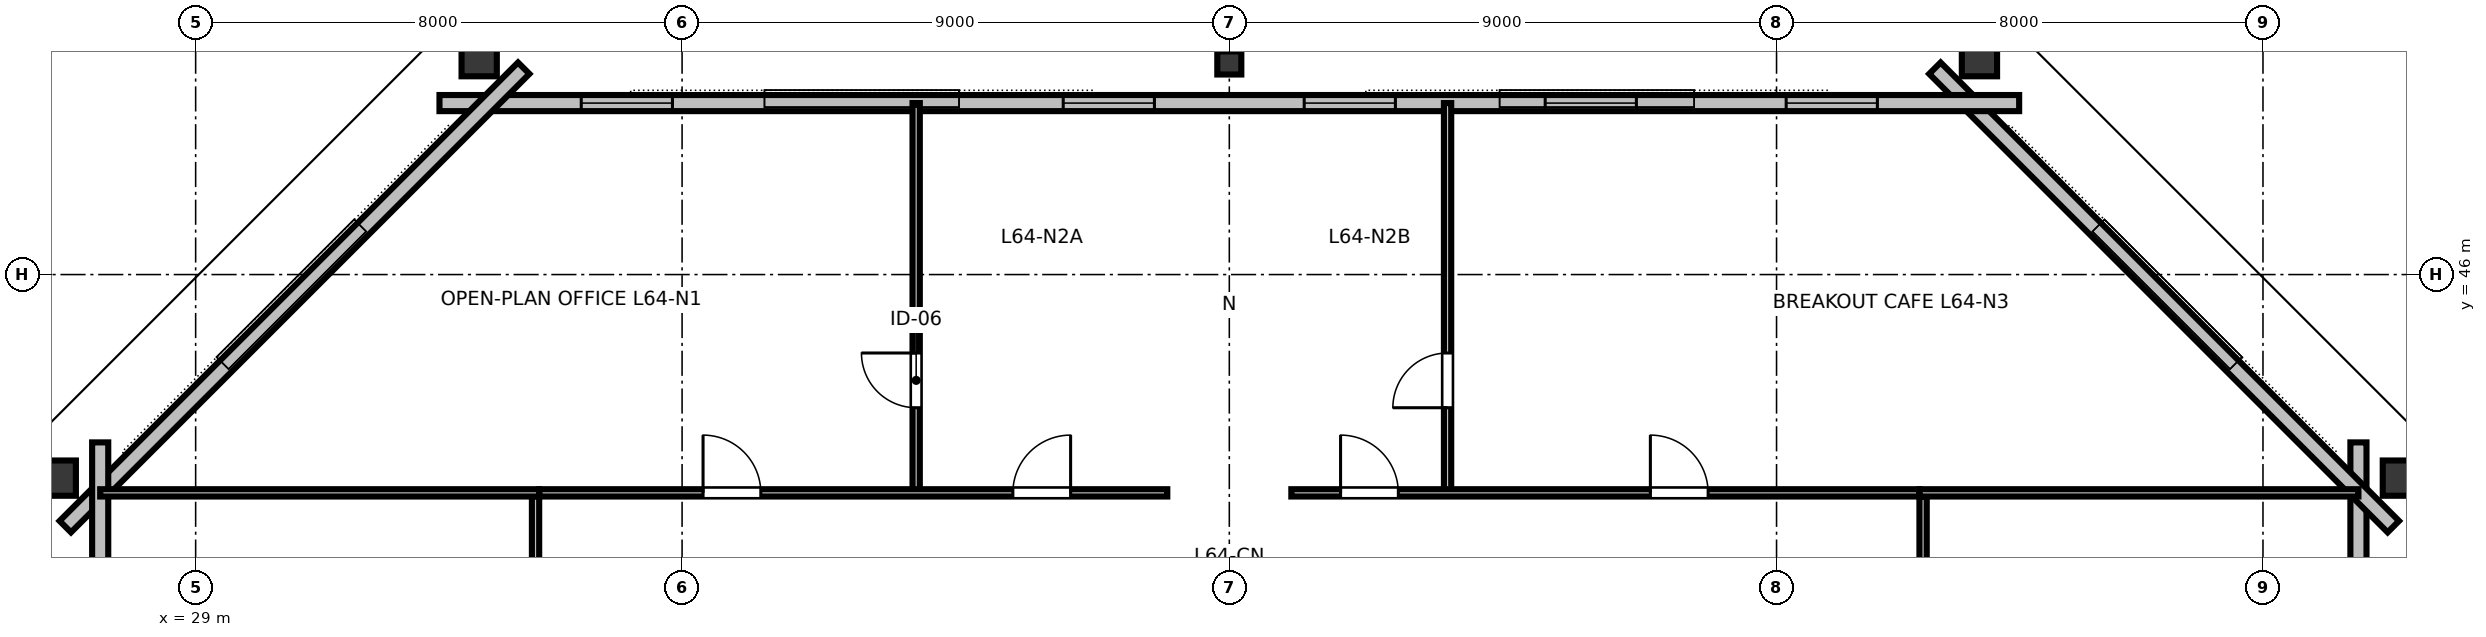
"""IFC4 building model, lengths in metres.
Left out: names, types, materials, properties, quantities, classifications, styles, units other than length and angle.
Written with IfcOpenShell. Run it as: python <this file> out.ifc"""

import sys

from ifc_helpers import new_model, si_unit, direction, frame, frame_2d, origin, origin_2d, place, context, subcontext, project, spatial, rectangle, hollow_rectangle, i_section, extrude, element, fill, save


model = new_model("IFC4")
c1 = context("Model", 3, precision=1e-05, world=origin(), true_north=direction((0.0, 1.0)))
c2 = subcontext(c1, "Body", "Model", "MODEL_VIEW")
j1 = project(units=[si_unit("LENGTHUNIT", "METRE"), si_unit("PLANEANGLEUNIT", "RADIAN")], contexts=[c1])
p1 = place(None, origin())
s1 = spatial("IfcSite", under=j1, at=p1, CompositionType="ELEMENT")
p2 = place(p1, origin())
s2 = spatial("IfcBuilding", under=s1, at=p2, CompositionType="ELEMENT")
p3 = place(p2, frame((0.0, 0.0, 243.0)))
s3 = spatial("IfcBuildingStorey", under=s2, at=p3, CompositionType="ELEMENT", Elevation=243.0)
for number, where, z_axis, x_axis in (
    (1, (65.32, 42.652, 0.0), (0.0, 0.0, 1.0), (0.0, 1.0, 0.0)),
    (2, (58.337, 49.61, 0.0), (0.0, 0.0, 1.0), (1.0, 0.0, 0.0)),
):
    element("IfcColumn", number, at=place(p3, frame(where, z_axis=z_axis, x_axis=x_axis)), inside=s3, PredefinedType="COLUMN", context=c2, shape_type="SweptSolid", body=[
        extrude(hollow_rectangle(XDim=0.58, YDim=0.7, WallThickness=0.032, at=origin_2d()), origin(), (0.0, 0.0, 1.0), 3.373),
    ])
p4 = place(p3, frame((46.0, 49.48, 0.0), z_axis=(0.0, 0.0, 1.0), x_axis=(1.0, 0.0, 0.0)))
e3 = element("IfcColumn", 3, at=p4, inside=s3, PredefinedType="COLUMN", context=c2, shape_type="SweptSolid", body=[
    extrude(i_section(OverallWidth=0.395, OverallDepth=0.38, WebThickness=0.019, FlangeThickness=0.03, FilletRadius=0.025, at=origin_2d()), origin(), (0.0, 0.0, 1.0), 3.373),
])
for number, where, z_axis, x_axis in (
    (4, (33.663, 49.61, 0.0), (0.0, 0.0, 1.0), (1.0, 0.0, 0.0)),
    (5, (26.68, 42.652, 0.0), (0.0, 0.0, 1.0), (0.0, 1.0, 0.0)),
):
    element("IfcColumn", number, at=place(p3, frame(where, z_axis=z_axis, x_axis=x_axis)), inside=s3, PredefinedType="COLUMN", context=c2, shape_type="SweptSolid", body=[
        extrude(hollow_rectangle(XDim=0.58, YDim=0.7, WallThickness=0.032, at=origin_2d()), origin(), (0.0, 0.0, 1.0), 3.373),
    ])
p5 = place(p3, frame((64.57, 20.76, 0.0), z_axis=(0.0, 0.0, 1.0), x_axis=(0.0, 1.0, 0.0)))
e6 = element("IfcWall", 6, at=p5, inside=s3, PredefinedType="STANDARD", context=c2, shape_type="SweptSolid", body=[
    extrude(rectangle(XDim=22.48, YDim=0.265, at=frame_2d((11.24, 0.0))), origin(), (0.0, 0.0, 1.0), 3.375),
])
p6 = place(p5, frame((2.378, 0.0, 0.85)))
e7 = element("IfcOpeningElement", 7, at=p6, cuts=e6, PredefinedType="OPENING", context=c2, shape_type="SweptSolid", body=[
    extrude(rectangle(XDim=1.5, YDim=1.85, at=frame_2d((0.75, 0.925))), frame((0.0, 0.142, 0.0), z_axis=(0.0, -1.0, 0.0), x_axis=(1.0, 0.0, 0.0)), (0.0, 0.0, 1.0), 0.285),
])
p7 = place(p5, frame((6.434, 0.0, 0.85)))
e8 = element("IfcOpeningElement", 8, at=p7, cuts=e6, PredefinedType="OPENING", context=c2, shape_type="SweptSolid", body=[
    extrude(rectangle(XDim=1.5, YDim=1.85, at=frame_2d((0.75, 0.925))), frame((0.0, 0.142, 0.0), z_axis=(0.0, -1.0, 0.0), x_axis=(1.0, 0.0, 0.0)), (0.0, 0.0, 1.0), 0.285),
])
p8 = place(p5, frame((14.546, 0.0, 0.85)))
e9 = element("IfcOpeningElement", 9, at=p8, cuts=e6, PredefinedType="OPENING", context=c2, shape_type="SweptSolid", body=[
    extrude(rectangle(XDim=1.5, YDim=1.85, at=frame_2d((0.75, 0.925))), frame((0.0, 0.142, 0.0), z_axis=(0.0, -1.0, 0.0), x_axis=(1.0, 0.0, 0.0)), (0.0, 0.0, 1.0), 0.285),
])
p9 = place(p5, frame((18.602, 0.0, 0.85)))
e10 = element("IfcOpeningElement", 10, at=p9, cuts=e6, PredefinedType="OPENING", context=c2, shape_type="SweptSolid", body=[
    extrude(rectangle(XDim=1.5, YDim=1.85, at=frame_2d((0.75, 0.925))), frame((0.0, 0.142, 0.0), z_axis=(0.0, -1.0, 0.0), x_axis=(1.0, 0.0, 0.0)), (0.0, 0.0, 1.0), 0.285),
])
p10 = place(p3, frame((65.144, 41.854, 0.0), z_axis=(0.0, 0.0, 1.0), x_axis=(-0.707106781187, 0.707106781187, 0.0)))
e11 = element("IfcWall", 11, at=p10, inside=s3, PredefinedType="STANDARD", context=c2, shape_type="SweptSolid", body=[
    extrude(rectangle(XDim=10.662, YDim=0.265, at=frame_2d((5.331, 0.0))), origin(), (0.0, 0.0, 1.0), 3.375),
])
p11 = place(p3, frame((58.99, 48.82, 0.0), z_axis=(0.0, 0.0, 1.0), x_axis=(-1.0, 0.0, 0.0)))
e12 = element("IfcWall", 12, at=p11, inside=s3, PredefinedType="STANDARD", context=c2, shape_type="SweptSolid", body=[
    extrude(rectangle(XDim=25.98, YDim=0.265, at=frame_2d((12.99, 0.0))), origin(), (0.0, 0.0, 1.0), 3.375),
])
p12 = place(p11, frame((2.332, 0.0, 0.85)))
e13 = element("IfcOpeningElement", 13, at=p12, cuts=e12, PredefinedType="OPENING", context=c2, shape_type="SweptSolid", body=[
    extrude(rectangle(XDim=1.5, YDim=1.85, at=frame_2d((0.75, 0.925))), frame((0.0, 0.142, 0.0), z_axis=(0.0, -1.0, 0.0), x_axis=(1.0, 0.0, 0.0)), (0.0, 0.0, 1.0), 0.285),
])
p13 = place(p11, frame((6.295, 0.0, 0.85)))
e14 = element("IfcOpeningElement", 14, at=p13, cuts=e12, PredefinedType="OPENING", context=c2, shape_type="SweptSolid", body=[
    extrude(rectangle(XDim=1.5, YDim=1.85, at=frame_2d((0.75, 0.925))), frame((0.0, 0.142, 0.0), z_axis=(0.0, -1.0, 0.0), x_axis=(1.0, 0.0, 0.0)), (0.0, 0.0, 1.0), 0.285),
])
p14 = place(p11, frame((10.258, 0.0, 0.85)))
e15 = element("IfcOpeningElement", 15, at=p14, cuts=e12, PredefinedType="OPENING", context=c2, shape_type="SweptSolid", body=[
    extrude(rectangle(XDim=1.5, YDim=1.85, at=frame_2d((0.75, 0.925))), frame((0.0, 0.142, 0.0), z_axis=(0.0, -1.0, 0.0), x_axis=(1.0, 0.0, 0.0)), (0.0, 0.0, 1.0), 0.285),
])
p15 = place(p11, frame((14.222, 0.0, 0.85)))
e16 = element("IfcOpeningElement", 16, at=p15, cuts=e12, PredefinedType="OPENING", context=c2, shape_type="SweptSolid", body=[
    extrude(rectangle(XDim=1.5, YDim=1.85, at=frame_2d((0.75, 0.925))), frame((0.0, 0.142, 0.0), z_axis=(0.0, -1.0, 0.0), x_axis=(1.0, 0.0, 0.0)), (0.0, 0.0, 1.0), 0.285),
])
p16 = place(p11, frame((22.148, 0.0, 0.85)))
e17 = element("IfcOpeningElement", 17, at=p16, cuts=e12, PredefinedType="OPENING", context=c2, shape_type="SweptSolid", body=[
    extrude(rectangle(XDim=1.5, YDim=1.85, at=frame_2d((0.75, 0.925))), frame((0.0, 0.142, 0.0), z_axis=(0.0, -1.0, 0.0), x_axis=(1.0, 0.0, 0.0)), (0.0, 0.0, 1.0), 0.285),
])
p17 = place(p3, frame((34.396, 49.394, 0.0), z_axis=(0.0, 0.0, 1.0), x_axis=(-0.707106781187, -0.707106781187, 0.0)))
e18 = element("IfcWall", 18, at=p17, inside=s3, PredefinedType="STANDARD", context=c2, shape_type="SweptSolid", body=[
    extrude(rectangle(XDim=10.662, YDim=0.265, at=frame_2d((5.331, 0.0))), origin(), (0.0, 0.0, 1.0), 3.375),
])
p18 = place(p3, frame((27.43, 43.24, 0.0), z_axis=(0.0, 0.0, 1.0), x_axis=(0.0, -1.0, 0.0)))
e19 = element("IfcWall", 19, at=p18, inside=s3, PredefinedType="STANDARD", context=c2, shape_type="SweptSolid", body=[
    extrude(rectangle(XDim=22.48, YDim=0.265, at=frame_2d((11.24, 0.0))), origin(), (0.0, 0.0, 1.0), 3.375),
])
p19 = place(p18, frame((2.378, 0.0, 0.85)))
e20 = element("IfcOpeningElement", 20, at=p19, cuts=e19, PredefinedType="OPENING", context=c2, shape_type="SweptSolid", body=[
    extrude(rectangle(XDim=1.5, YDim=1.85, at=frame_2d((0.75, 0.925))), frame((0.0, 0.142, 0.0), z_axis=(0.0, -1.0, 0.0), x_axis=(1.0, 0.0, 0.0)), (0.0, 0.0, 1.0), 0.285),
])
p20 = place(p18, frame((6.434, 0.0, 0.85)))
e21 = element("IfcOpeningElement", 21, at=p20, cuts=e19, PredefinedType="OPENING", context=c2, shape_type="SweptSolid", body=[
    extrude(rectangle(XDim=1.5, YDim=1.85, at=frame_2d((0.75, 0.925))), frame((0.0, 0.142, 0.0), z_axis=(0.0, -1.0, 0.0), x_axis=(1.0, 0.0, 0.0)), (0.0, 0.0, 1.0), 0.285),
])
p21 = place(p18, frame((14.546, 0.0, 0.85)))
e22 = element("IfcOpeningElement", 22, at=p21, cuts=e19, PredefinedType="OPENING", context=c2, shape_type="SweptSolid", body=[
    extrude(rectangle(XDim=1.5, YDim=1.85, at=frame_2d((0.75, 0.925))), frame((0.0, 0.142, 0.0), z_axis=(0.0, -1.0, 0.0), x_axis=(1.0, 0.0, 0.0)), (0.0, 0.0, 1.0), 0.285),
])
p22 = place(p18, frame((18.602, 0.0, 0.85)))
e23 = element("IfcOpeningElement", 23, at=p22, cuts=e19, PredefinedType="OPENING", context=c2, shape_type="SweptSolid", body=[
    extrude(rectangle(XDim=1.5, YDim=1.85, at=frame_2d((0.75, 0.925))), frame((0.0, 0.142, 0.0), z_axis=(0.0, -1.0, 0.0), x_axis=(1.0, 0.0, 0.0)), (0.0, 0.0, 1.0), 0.285),
])
p23 = place(p3, frame((40.85, 42.41, 0.0), z_axis=(0.0, 0.0, 1.0), x_axis=(0.0, 1.0, 0.0)))
e24 = element("IfcWall", 24, at=p23, inside=s3, PredefinedType="PARTITIONING", context=c2, shape_type="SweptSolid", body=[
    extrude(rectangle(XDim=6.41, YDim=0.12, at=frame_2d((3.205, 0.0))), origin(), (0.0, 0.0, 1.0), 2.655),
])
p24 = place(p23, frame((1.4, 0.0, 0.0)))
e25 = element("IfcOpeningElement", 25, at=p24, cuts=e24, PredefinedType="OPENING", context=c2, shape_type="SweptSolid", body=[
    extrude(rectangle(XDim=0.9, YDim=2.15, at=frame_2d((0.45, 1.075))), frame((0.0, 0.07, 0.0), z_axis=(0.0, -1.0, 0.0), x_axis=(1.0, 0.0, 0.0)), (0.0, 0.0, 1.0), 0.14),
])
p25 = place(p3, frame((49.59, 42.41, 0.0), z_axis=(0.0, 0.0, 1.0), x_axis=(0.0, 1.0, 0.0)))
e26 = element("IfcWall", 26, at=p25, inside=s3, PredefinedType="PARTITIONING", context=c2, shape_type="SweptSolid", body=[
    extrude(rectangle(XDim=6.41, YDim=0.12, at=frame_2d((3.205, 0.0))), origin(), (0.0, 0.0, 1.0), 2.655),
])
p26 = place(p25, frame((1.4, 0.0, 0.0)))
e27 = element("IfcOpeningElement", 27, at=p26, cuts=e26, PredefinedType="OPENING", context=c2, shape_type="SweptSolid", body=[
    extrude(rectangle(XDim=0.9, YDim=2.15, at=frame_2d((0.45, 1.075))), frame((0.0, 0.07, 0.0), z_axis=(0.0, -1.0, 0.0), x_axis=(1.0, 0.0, 0.0)), (0.0, 0.0, 1.0), 0.14),
])
p27 = place(p3, frame((34.65, 42.41, 0.0), z_axis=(0.0, 0.0, 1.0), x_axis=(1.0, 0.0, 0.0)))
e28 = element("IfcWall", 28, at=p27, inside=s3, PredefinedType="PARTITIONING", context=c2, shape_type="SweptSolid", body=[
    extrude(rectangle(XDim=10.33, YDim=0.12, at=frame_2d((5.165, 0.0))), origin(), (0.0, 0.0, 1.0), 2.655),
])
p28 = place(p27, frame((2.695, 0.0, 0.0)))
e29 = element("IfcOpeningElement", 29, at=p28, cuts=e28, PredefinedType="OPENING", context=c2, shape_type="SweptSolid", body=[
    extrude(rectangle(XDim=0.95, YDim=2.15, at=frame_2d((0.475, 1.075))), frame((0.0, 0.07, 0.0), z_axis=(0.0, -1.0, 0.0), x_axis=(1.0, 0.0, 0.0)), (0.0, 0.0, 1.0), 0.14),
])
p29 = place(p27, frame((7.79, 0.0, 0.0)))
e30 = element("IfcOpeningElement", 30, at=p29, cuts=e28, PredefinedType="OPENING", context=c2, shape_type="SweptSolid", body=[
    extrude(rectangle(XDim=0.95, YDim=2.15, at=frame_2d((0.475, 1.075))), frame((0.0, 0.07, 0.0), z_axis=(0.0, -1.0, 0.0), x_axis=(1.0, 0.0, 0.0)), (0.0, 0.0, 1.0), 0.14),
])
p30 = place(p3, frame((47.02, 42.41, 0.0), z_axis=(0.0, 0.0, 1.0), x_axis=(1.0, 0.0, 0.0)))
e31 = element("IfcWall", 31, at=p30, inside=s3, PredefinedType="PARTITIONING", context=c2, shape_type="SweptSolid", body=[
    extrude(rectangle(XDim=10.33, YDim=0.12, at=frame_2d((5.165, 0.0))), origin(), (0.0, 0.0, 1.0), 2.655),
])
p31 = place(p30, frame((0.81, 0.0, 0.0)))
e32 = element("IfcOpeningElement", 32, at=p31, cuts=e31, PredefinedType="OPENING", context=c2, shape_type="SweptSolid", body=[
    extrude(rectangle(XDim=0.95, YDim=2.15, at=frame_2d((0.475, 1.075))), frame((0.0, 0.07, 0.0), z_axis=(0.0, -1.0, 0.0), x_axis=(1.0, 0.0, 0.0)), (0.0, 0.0, 1.0), 0.14),
])
p32 = place(p30, frame((5.905, 0.0, 0.0)))
e33 = element("IfcOpeningElement", 33, at=p32, cuts=e31, PredefinedType="OPENING", context=c2, shape_type="SweptSolid", body=[
    extrude(rectangle(XDim=0.95, YDim=2.15, at=frame_2d((0.475, 1.075))), frame((0.0, 0.07, 0.0), z_axis=(0.0, -1.0, 0.0), x_axis=(1.0, 0.0, 0.0)), (0.0, 0.0, 1.0), 0.14),
])
p33 = place(p3, frame((34.59, 21.65, 0.0), z_axis=(0.0, 0.0, 1.0), x_axis=(0.0, 1.0, 0.0)))
e34 = element("IfcWall", 34, at=p33, inside=s3, PredefinedType="PARTITIONING", context=c2, shape_type="SweptSolid", body=[
    extrude(rectangle(XDim=20.7, YDim=0.12, at=frame_2d((10.35, 0.0))), origin(), (0.0, 0.0, 1.0), 2.655),
])
p34 = place(p33, frame((4.26, 0.0, 0.0)))
e35 = element("IfcOpeningElement", 35, at=p34, cuts=e34, PredefinedType="OPENING", context=c2, shape_type="SweptSolid", body=[
    extrude(rectangle(XDim=0.95, YDim=2.15, at=frame_2d((0.475, 1.075))), frame((0.0, 0.07, 0.0), z_axis=(0.0, -1.0, 0.0), x_axis=(1.0, 0.0, 0.0)), (0.0, 0.0, 1.0), 0.14),
])
p35 = place(p33, frame((14.411, 0.0, 0.0)))
e36 = element("IfcOpeningElement", 36, at=p35, cuts=e34, PredefinedType="OPENING", context=c2, shape_type="SweptSolid", body=[
    extrude(rectangle(XDim=0.95, YDim=2.15, at=frame_2d((0.475, 1.075))), frame((0.0, 0.07, 0.0), z_axis=(0.0, -1.0, 0.0), x_axis=(1.0, 0.0, 0.0)), (0.0, 0.0, 1.0), 0.14),
])
p36 = place(p3, frame((57.41, 21.65, 0.0), z_axis=(0.0, 0.0, 1.0), x_axis=(0.0, 1.0, 0.0)))
e37 = element("IfcWall", 37, at=p36, inside=s3, PredefinedType="PARTITIONING", context=c2, shape_type="SweptSolid", body=[
    extrude(rectangle(XDim=20.7, YDim=0.12, at=frame_2d((10.35, 0.0))), origin(), (0.0, 0.0, 1.0), 2.655),
])
p37 = place(p36, frame((9.875, 0.0, 0.0)))
e38 = element("IfcOpeningElement", 38, at=p37, cuts=e37, PredefinedType="OPENING", context=c2, shape_type="SweptSolid", body=[
    extrude(rectangle(XDim=0.95, YDim=2.15, at=frame_2d((0.475, 1.075))), frame((0.0, 0.07, 0.0), z_axis=(0.0, -1.0, 0.0), x_axis=(1.0, 0.0, 0.0)), (0.0, 0.0, 1.0), 0.14),
])
for number, where, z_axis, x_axis in (
    (39, (34.65, 42.41, 0.0), (0.0, 0.0, 1.0), (-1.0, 0.0, 0.0)),
    (40, (57.35, 42.41, 0.0), (0.0, 0.0, 1.0), (1.0, 0.0, 0.0)),
):
    element("IfcWall", number, at=place(p3, frame(where, z_axis=z_axis, x_axis=x_axis)), inside=s3, PredefinedType="PARTITIONING", context=c2, shape_type="SweptSolid", body=[
        extrude(rectangle(XDim=7.22, YDim=0.12, at=frame_2d((3.61, 0.0))), origin(), (0.0, 0.0, 1.0), 2.655),
    ])
p38 = place(p12, origin())
e41 = element("IfcWindow", 41, at=p38, inside=s3, PartitioningType="SINGLE_PANEL", PredefinedType="WINDOW", context=c2, shape_type="SweptSolid", body=[
    extrude(rectangle(XDim=1.5, YDim=1.85, at=frame_2d((0.75, 0.925))), frame((0.0, 0.03, 0.0), z_axis=(0.0, -1.0, 0.0), x_axis=(1.0, 0.0, 0.0)), (0.0, 0.0, 1.0), 0.06),
])
fill(e13, e41)
p39 = place(p13, origin())
e42 = element("IfcWindow", 42, at=p39, inside=s3, PartitioningType="SINGLE_PANEL", PredefinedType="WINDOW", context=c2, shape_type="SweptSolid", body=[
    extrude(rectangle(XDim=1.5, YDim=1.85, at=frame_2d((0.75, 0.925))), frame((0.0, 0.03, 0.0), z_axis=(0.0, -1.0, 0.0), x_axis=(1.0, 0.0, 0.0)), (0.0, 0.0, 1.0), 0.06),
])
fill(e14, e42)
p40 = place(p14, origin())
e43 = element("IfcWindow", 43, at=p40, inside=s3, PartitioningType="SINGLE_PANEL", PredefinedType="WINDOW", context=c2, shape_type="SweptSolid", body=[
    extrude(rectangle(XDim=1.5, YDim=1.85, at=frame_2d((0.75, 0.925))), frame((0.0, 0.03, 0.0), z_axis=(0.0, -1.0, 0.0), x_axis=(1.0, 0.0, 0.0)), (0.0, 0.0, 1.0), 0.06),
])
fill(e15, e43)
p41 = place(p15, origin())
e44 = element("IfcWindow", 44, at=p41, inside=s3, PartitioningType="SINGLE_PANEL", PredefinedType="WINDOW", context=c2, shape_type="SweptSolid", body=[
    extrude(rectangle(XDim=1.5, YDim=1.85, at=frame_2d((0.75, 0.925))), frame((0.0, 0.03, 0.0), z_axis=(0.0, -1.0, 0.0), x_axis=(1.0, 0.0, 0.0)), (0.0, 0.0, 1.0), 0.06),
])
fill(e16, e44)
p42 = place(p16, origin())
e45 = element("IfcWindow", 45, at=p42, inside=s3, PartitioningType="SINGLE_PANEL", PredefinedType="WINDOW", context=c2, shape_type="SweptSolid", body=[
    extrude(rectangle(XDim=1.5, YDim=1.85, at=frame_2d((0.75, 0.925))), frame((0.0, 0.03, 0.0), z_axis=(0.0, -1.0, 0.0), x_axis=(1.0, 0.0, 0.0)), (0.0, 0.0, 1.0), 0.06),
])
fill(e17, e45)
p43 = place(p24, origin())
e46 = element("IfcDoor", 46, at=p43, inside=s3, OperationType="SINGLE_SWING_RIGHT", PredefinedType="DOOR", context=c2, shape_type="SweptSolid", body=[
    extrude(rectangle(XDim=0.9, YDim=2.15, at=frame_2d((0.45, 1.075))), frame((0.0, 0.025, 0.0), z_axis=(0.0, -1.0, 0.0), x_axis=(1.0, 0.0, 0.0)), (0.0, 0.0, 1.0), 0.05),
])
fill(e25, e46)
p44 = place(p26, origin())
e47 = element("IfcDoor", 47, at=p44, inside=s3, OperationType="SINGLE_SWING_LEFT", PredefinedType="DOOR", context=c2, shape_type="SweptSolid", body=[
    extrude(rectangle(XDim=0.9, YDim=2.15, at=frame_2d((0.45, 1.075))), frame((0.0, 0.025, 0.0), z_axis=(0.0, -1.0, 0.0), x_axis=(1.0, 0.0, 0.0)), (0.0, 0.0, 1.0), 0.05),
])
fill(e27, e47)
p45 = place(p28, origin())
e48 = element("IfcDoor", 48, at=p45, inside=s3, OperationType="SINGLE_SWING_LEFT", PredefinedType="DOOR", context=c2, shape_type="SweptSolid", body=[
    extrude(rectangle(XDim=0.95, YDim=2.15, at=frame_2d((0.475, 1.075))), frame((0.0, 0.025, 0.0), z_axis=(0.0, -1.0, 0.0), x_axis=(1.0, 0.0, 0.0)), (0.0, 0.0, 1.0), 0.05),
])
fill(e29, e48)
p46 = place(p29, origin())
e49 = element("IfcDoor", 49, at=p46, inside=s3, OperationType="SINGLE_SWING_RIGHT", PredefinedType="DOOR", context=c2, shape_type="SweptSolid", body=[
    extrude(rectangle(XDim=0.95, YDim=2.15, at=frame_2d((0.475, 1.075))), frame((0.0, 0.025, 0.0), z_axis=(0.0, -1.0, 0.0), x_axis=(1.0, 0.0, 0.0)), (0.0, 0.0, 1.0), 0.05),
])
fill(e30, e49)
p47 = place(p31, origin())
e50 = element("IfcDoor", 50, at=p47, inside=s3, OperationType="SINGLE_SWING_LEFT", PredefinedType="DOOR", context=c2, shape_type="SweptSolid", body=[
    extrude(rectangle(XDim=0.95, YDim=2.15, at=frame_2d((0.475, 1.075))), frame((0.0, 0.025, 0.0), z_axis=(0.0, -1.0, 0.0), x_axis=(1.0, 0.0, 0.0)), (0.0, 0.0, 1.0), 0.05),
])
fill(e32, e50)
p48 = place(p32, origin())
e51 = element("IfcDoor", 51, at=p48, inside=s3, OperationType="SINGLE_SWING_LEFT", PredefinedType="DOOR", context=c2, shape_type="SweptSolid", body=[
    extrude(rectangle(XDim=0.95, YDim=2.15, at=frame_2d((0.475, 1.075))), frame((0.0, 0.025, 0.0), z_axis=(0.0, -1.0, 0.0), x_axis=(1.0, 0.0, 0.0)), (0.0, 0.0, 1.0), 0.05),
])
fill(e33, e51)
save(model, sys.argv[1])
